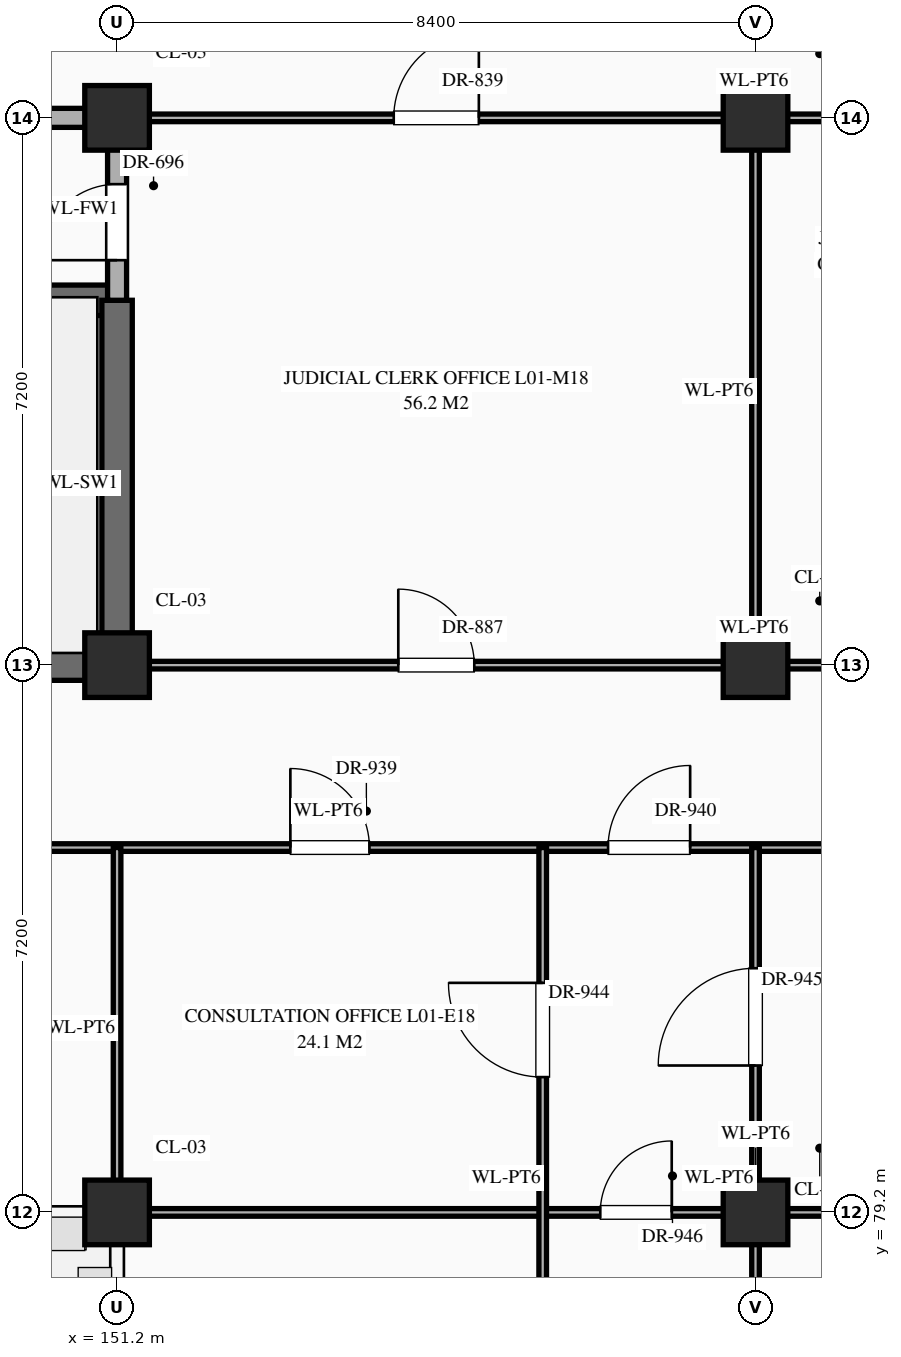
"""IFC4 building model, lengths in metres.
Left out: names, types, materials, properties, quantities, classifications, styles, units other than length and angle.
Written with IfcOpenShell. Run it as: python <this file> out.ifc"""

import sys

from ifc_helpers import new_model, si_unit, direction, frame, frame_2d, origin, origin_2d, place, context, subcontext, project, spatial, rectangle, extrude, element, fill, save


model = new_model("IFC4")
c1 = context("Model", 3, precision=1e-05, world=origin(), true_north=direction((0.0, 1.0)))
c2 = subcontext(c1, "Body", "Model", "MODEL_VIEW")
j1 = project(units=[si_unit("LENGTHUNIT", "METRE"), si_unit("PLANEANGLEUNIT", "RADIAN")], contexts=[c1])
p1 = place(None, origin())
s1 = spatial("IfcSite", under=j1, at=p1, CompositionType="ELEMENT")
p2 = place(p1, origin())
s2 = spatial("IfcBuilding", under=s1, at=p2, CompositionType="ELEMENT")
p3 = place(p2, origin())
s3 = spatial("IfcBuildingStorey", under=s2, at=p3, CompositionType="ELEMENT", Elevation=0.0)
for number, where, z_axis, x_axis in (
    (1, (151.2, 79.2, 0.0), (0.0, 0.0, 1.0), (1.0, 0.0, 0.0)),
    (2, (151.2, 86.4, 0.0), (0.0, 0.0, 1.0), (1.0, 0.0, 0.0)),
    (3, (151.2, 93.6, 0.0), (0.0, 0.0, 1.0), (1.0, 0.0, 0.0)),
    (4, (159.6, 79.2, 0.0), (0.0, 0.0, 1.0), (1.0, 0.0, 0.0)),
    (5, (159.6, 86.4, 0.0), (0.0, 0.0, 1.0), (1.0, 0.0, 0.0)),
    (6, (159.6, 93.6, 0.0), (0.0, 0.0, 1.0), (1.0, 0.0, 0.0)),
):
    element("IfcColumn", number, at=place(p3, frame(where, z_axis=z_axis, x_axis=x_axis)), inside=s3, PredefinedType="COLUMN", context=c2, shape_type="SweptSolid", body=[
        extrude(rectangle(XDim=0.85, YDim=0.85, at=origin_2d()), origin(), (0.0, 0.0, 1.0), 5.4),
    ])
p4 = place(p3, frame((151.24, 79.2, 0.0), z_axis=(0.0, 0.0, 1.0), x_axis=(1.0, 0.0, 0.0)))
e7 = element("IfcWall", 7, at=p4, inside=s3, PredefinedType="STANDARD", context=c2, shape_type="SweptSolid", body=[
    extrude(rectangle(XDim=16.72, YDim=0.1, at=frame_2d((8.36, 0.0))), origin(), (0.0, 0.0, 1.0), 4.27),
])
p5 = place(p4, frame((6.317, 0.0, 0.0)))
e8 = element("IfcOpeningElement", 8, at=p5, cuts=e7, PredefinedType="OPENING", context=c2, shape_type="SweptSolid", body=[
    extrude(rectangle(XDim=0.94, YDim=2.3, at=frame_2d((0.47, 1.15))), frame((0.0, 0.062, 0.0), z_axis=(0.0, -1.0, 0.0), x_axis=(1.0, 0.0, 0.0)), (0.0, 0.0, 1.0), 0.124),
])
p6 = place(p3, frame((140.0, 84.0, 0.0), z_axis=(0.0, 0.0, 1.0), x_axis=(1.0, 0.0, 0.0)))
e9 = element("IfcWall", 9, at=p6, inside=s3, PredefinedType="STANDARD", context=c2, shape_type="SweptSolid", body=[
    extrude(rectangle(XDim=27.96, YDim=0.1, at=frame_2d((13.98, 0.0))), origin(), (0.0, 0.0, 1.0), 5.12),
])
p7 = place(p6, frame((0.92, 0.0, 0.0)))
e10 = element("IfcOpeningElement", 10, at=p7, cuts=e9, PredefinedType="OPENING", context=c2, shape_type="SweptSolid", body=[
    extrude(rectangle(XDim=0.96, YDim=2.2, at=frame_2d((0.48, 1.1))), frame((0.0, 0.062, 0.0), z_axis=(0.0, -1.0, 0.0), x_axis=(1.0, 0.0, 0.0)), (0.0, 0.0, 1.0), 0.124),
])
p8 = place(p6, frame((6.5, 0.0, 0.0)))
e11 = element("IfcOpeningElement", 11, at=p8, cuts=e9, PredefinedType="OPENING", context=c2, shape_type="SweptSolid", body=[
    extrude(rectangle(XDim=1.0, YDim=2.25, at=frame_2d((0.5, 1.125))), frame((0.0, 0.062, 0.0), z_axis=(0.0, -1.0, 0.0), x_axis=(1.0, 0.0, 0.0)), (0.0, 0.0, 1.0), 0.124),
])
p9 = place(p6, frame((13.48, 0.0, 0.0)))
e12 = element("IfcOpeningElement", 12, at=p9, cuts=e9, PredefinedType="OPENING", context=c2, shape_type="SweptSolid", body=[
    extrude(rectangle(XDim=1.04, YDim=2.2, at=frame_2d((0.52, 1.1))), frame((0.0, 0.062, 0.0), z_axis=(0.0, -1.0, 0.0), x_axis=(1.0, 0.0, 0.0)), (0.0, 0.0, 1.0), 0.124),
])
p10 = place(p6, frame((17.66, 0.0, 0.0)))
e13 = element("IfcOpeningElement", 13, at=p10, cuts=e9, PredefinedType="OPENING", context=c2, shape_type="SweptSolid", body=[
    extrude(rectangle(XDim=1.08, YDim=2.25, at=frame_2d((0.54, 1.125))), frame((0.0, 0.062, 0.0), z_axis=(0.0, -1.0, 0.0), x_axis=(1.0, 0.0, 0.0)), (0.0, 0.0, 1.0), 0.124),
])
p11 = place(p6, frame((23.22, 0.0, 0.0)))
e14 = element("IfcOpeningElement", 14, at=p11, cuts=e9, PredefinedType="OPENING", context=c2, shape_type="SweptSolid", body=[
    extrude(rectangle(XDim=1.12, YDim=2.25, at=frame_2d((0.56, 1.125))), frame((0.0, 0.062, 0.0), z_axis=(0.0, -1.0, 0.0), x_axis=(1.0, 0.0, 0.0)), (0.0, 0.0, 1.0), 0.124),
])
p12 = place(p3, frame((142.8, 86.4, 0.0), z_axis=(0.0, 0.0, 1.0), x_axis=(1.0, 0.0, 0.0)))
e15 = element("IfcWall", 15, at=p12, inside=s3, PredefinedType="SHEAR", context=c2, shape_type="SweptSolid", body=[
    extrude(rectangle(XDim=8.4, YDim=0.4, at=frame_2d((4.2, 0.0))), origin(), (0.0, 0.0, 1.0), 5.12),
])
p13 = place(p3, frame((151.2, 86.4, 0.0), z_axis=(0.0, 0.0, 1.0), x_axis=(1.0, 0.0, 0.0)))
e16 = element("IfcWall", 16, at=p13, inside=s3, PredefinedType="STANDARD", context=c2, shape_type="SweptSolid", body=[
    extrude(rectangle(XDim=16.76, YDim=0.1, at=frame_2d((8.38, 0.0))), origin(), (0.0, 0.0, 1.0), 4.27),
])
p14 = place(p13, frame((3.7, 0.0, 0.0)))
e17 = element("IfcOpeningElement", 17, at=p14, cuts=e16, PredefinedType="OPENING", context=c2, shape_type="SweptSolid", body=[
    extrude(rectangle(XDim=1.0, YDim=2.25, at=frame_2d((0.5, 1.125))), frame((0.0, 0.062, 0.0), z_axis=(0.0, -1.0, 0.0), x_axis=(1.0, 0.0, 0.0)), (0.0, 0.0, 1.0), 0.124),
])
p15 = place(p13, frame((9.433, 0.0, 0.0)))
e18 = element("IfcOpeningElement", 18, at=p15, cuts=e16, PredefinedType="OPENING", context=c2, shape_type="SweptSolid", body=[
    extrude(rectangle(XDim=1.08, YDim=2.25, at=frame_2d((0.54, 1.125))), frame((0.0, 0.062, 0.0), z_axis=(0.0, -1.0, 0.0), x_axis=(1.0, 0.0, 0.0)), (0.0, 0.0, 1.0), 0.124),
])
p16 = place(p13, frame((12.02, 0.0, 0.0)))
e19 = element("IfcOpeningElement", 19, at=p16, cuts=e16, PredefinedType="OPENING", context=c2, shape_type="SweptSolid", body=[
    extrude(rectangle(XDim=1.16, YDim=2.3, at=frame_2d((0.58, 1.15))), frame((0.0, 0.062, 0.0), z_axis=(0.0, -1.0, 0.0), x_axis=(1.0, 0.0, 0.0)), (0.0, 0.0, 1.0), 0.124),
])
p17 = place(p13, frame((14.627, 0.0, 0.0)))
e20 = element("IfcOpeningElement", 20, at=p17, cuts=e16, PredefinedType="OPENING", context=c2, shape_type="SweptSolid", body=[
    extrude(rectangle(XDim=1.2, YDim=2.35, at=frame_2d((0.6, 1.175))), frame((0.0, 0.062, 0.0), z_axis=(0.0, -1.0, 0.0), x_axis=(1.0, 0.0, 0.0)), (0.0, 0.0, 1.0), 0.124),
])
p18 = place(p3, frame((142.8, 91.2, 0.0), z_axis=(0.0, 0.0, 1.0), x_axis=(1.0, 0.0, 0.0)))
e21 = element("IfcWall", 21, at=p18, inside=s3, PredefinedType="SHEAR", context=c2, shape_type="SweptSolid", body=[
    extrude(rectangle(XDim=8.4, YDim=0.4, at=frame_2d((4.2, 0.0))), origin(), (0.0, 0.0, 1.0), 5.12),
])
p19 = place(p18, frame((0.65, 0.0, 0.0)))
e22 = element("IfcOpeningElement", 22, at=p19, cuts=e21, PredefinedType="OPENING", context=c2, shape_type="SweptSolid", body=[
    extrude(rectangle(XDim=1.1, YDim=2.2, at=frame_2d((0.55, 1.1))), frame((0.0, 0.212, 0.0), z_axis=(0.0, -1.0, 0.0), x_axis=(1.0, 0.0, 0.0)), (0.0, 0.0, 1.0), 0.424),
])
p20 = place(p3, frame((137.2, 93.6, 0.0), z_axis=(0.0, 0.0, 1.0), x_axis=(1.0, 0.0, 0.0)))
e23 = element("IfcWall", 23, at=p20, inside=s3, PredefinedType="STANDARD", context=c2, shape_type="SweptSolid", body=[
    extrude(rectangle(XDim=14.0, YDim=0.25, at=frame_2d((7.0, 0.0))), origin(), (0.0, 0.0, 1.0), 4.27),
])
p21 = place(p20, frame((8.8, 0.0, 0.0)))
e24 = element("IfcOpeningElement", 24, at=p21, cuts=e23, PredefinedType="OPENING", context=c2, shape_type="SweptSolid", body=[
    extrude(rectangle(XDim=2.0, YDim=2.4, at=frame_2d((1.0, 1.2))), frame((0.0, 0.137, 0.0), z_axis=(0.0, -1.0, 0.0), x_axis=(1.0, 0.0, 0.0)), (0.0, 0.0, 1.0), 0.274),
])
p22 = place(p20, frame((0.65, 0.0, 0.0)))
e25 = element("IfcOpeningElement", 25, at=p22, cuts=e23, PredefinedType="OPENING", context=c2, shape_type="SweptSolid", body=[
    extrude(rectangle(XDim=1.5, YDim=2.25, at=frame_2d((0.75, 1.125))), frame((0.0, 0.137, 0.0), z_axis=(0.0, -1.0, 0.0), x_axis=(1.0, 0.0, 0.0)), (0.0, 0.0, 1.0), 0.274),
])
p23 = place(p20, frame((3.028, 0.0, 0.0)))
e26 = element("IfcOpeningElement", 26, at=p23, cuts=e23, PredefinedType="OPENING", context=c2, shape_type="SweptSolid", body=[
    extrude(rectangle(XDim=2.0, YDim=2.4, at=frame_2d((1.0, 1.2))), frame((0.0, 0.137, 0.0), z_axis=(0.0, -1.0, 0.0), x_axis=(1.0, 0.0, 0.0)), (0.0, 0.0, 1.0), 0.274),
])
p24 = place(p3, frame((151.2, 93.6, 0.0), z_axis=(0.0, 0.0, 1.0), x_axis=(1.0, 0.0, 0.0)))
e27 = element("IfcWall", 27, at=p24, inside=s3, PredefinedType="STANDARD", context=c2, shape_type="SweptSolid", body=[
    extrude(rectangle(XDim=16.76, YDim=0.1, at=frame_2d((8.38, 0.0))), origin(), (0.0, 0.0, 1.0), 4.27),
])
p25 = place(p24, frame((3.64, 0.0, 0.0)))
e28 = element("IfcOpeningElement", 28, at=p25, cuts=e27, PredefinedType="OPENING", context=c2, shape_type="SweptSolid", body=[
    extrude(rectangle(XDim=1.12, YDim=2.25, at=frame_2d((0.56, 1.125))), frame((0.0, 0.062, 0.0), z_axis=(0.0, -1.0, 0.0), x_axis=(1.0, 0.0, 0.0)), (0.0, 0.0, 1.0), 0.124),
])
p26 = place(p24, frame((9.393, 0.0, 0.0)))
e29 = element("IfcOpeningElement", 29, at=p26, cuts=e27, PredefinedType="OPENING", context=c2, shape_type="SweptSolid", body=[
    extrude(rectangle(XDim=1.16, YDim=2.3, at=frame_2d((0.58, 1.15))), frame((0.0, 0.062, 0.0), z_axis=(0.0, -1.0, 0.0), x_axis=(1.0, 0.0, 0.0)), (0.0, 0.0, 1.0), 0.124),
])
p27 = place(p24, frame((12.0, 0.0, 0.0)))
e30 = element("IfcOpeningElement", 30, at=p27, cuts=e27, PredefinedType="OPENING", context=c2, shape_type="SweptSolid", body=[
    extrude(rectangle(XDim=1.2, YDim=2.35, at=frame_2d((0.6, 1.175))), frame((0.0, 0.062, 0.0), z_axis=(0.0, -1.0, 0.0), x_axis=(1.0, 0.0, 0.0)), (0.0, 0.0, 1.0), 0.124),
])
p28 = place(p24, frame((14.607, 0.0, 0.0)))
e31 = element("IfcOpeningElement", 31, at=p28, cuts=e27, PredefinedType="OPENING", context=c2, shape_type="SweptSolid", body=[
    extrude(rectangle(XDim=1.24, YDim=2.3, at=frame_2d((0.62, 1.15))), frame((0.0, 0.062, 0.0), z_axis=(0.0, -1.0, 0.0), x_axis=(1.0, 0.0, 0.0)), (0.0, 0.0, 1.0), 0.124),
])
p29 = place(p3, frame((151.2, 79.24, 0.0), z_axis=(0.0, 0.0, 1.0), x_axis=(0.0, 1.0, 0.0)))
e32 = element("IfcWall", 32, at=p29, inside=s3, PredefinedType="STANDARD", context=c2, shape_type="SweptSolid", body=[
    extrude(rectangle(XDim=4.76, YDim=0.1, at=frame_2d((2.38, 0.0))), origin(), (0.0, 0.0, 1.0), 4.37),
])
p30 = place(p3, frame((151.2, 86.4, 0.0), z_axis=(0.0, 0.0, 1.0), x_axis=(0.0, 1.0, 0.0)))
e33 = element("IfcWall", 33, at=p30, inside=s3, PredefinedType="SHEAR", context=c2, shape_type="SweptSolid", body=[
    extrude(rectangle(XDim=4.8, YDim=0.4, at=frame_2d((2.4, 0.0))), origin(), (0.0, 0.0, 1.0), 5.12),
])
p31 = place(p3, frame((151.2, 91.2, 0.0), z_axis=(0.0, 0.0, 1.0), x_axis=(0.0, 1.0, 0.0)))
e34 = element("IfcWall", 34, at=p31, inside=s3, PredefinedType="STANDARD", context=c2, shape_type="SweptSolid", body=[
    extrude(rectangle(XDim=2.4, YDim=0.25, at=frame_2d((1.2, 0.0))), origin(), (0.0, 0.0, 1.0), 4.37),
])
p32 = place(p31, frame((0.528, 0.0, 0.0)))
e35 = element("IfcOpeningElement", 35, at=p32, cuts=e34, PredefinedType="OPENING", context=c2, shape_type="SweptSolid", body=[
    extrude(rectangle(XDim=1.0, YDim=2.2, at=frame_2d((0.5, 1.1))), frame((0.0, 0.137, 0.0), z_axis=(0.0, -1.0, 0.0), x_axis=(1.0, 0.0, 0.0)), (0.0, 0.0, 1.0), 0.274),
])
p33 = place(p3, frame((156.8, 57.6, 0.0), z_axis=(0.0, 0.0, 1.0), x_axis=(0.0, 1.0, 0.0)))
e36 = element("IfcWall", 36, at=p33, inside=s3, PredefinedType="STANDARD", context=c2, shape_type="SweptSolid", body=[
    extrude(rectangle(XDim=26.4, YDim=0.1, at=frame_2d((13.2, 0.0))), origin(), (0.0, 0.0, 1.0), 5.12),
])
p34 = place(p33, frame((23.38, 0.0, 0.0)))
e37 = element("IfcOpeningElement", 37, at=p34, cuts=e36, PredefinedType="OPENING", context=c2, shape_type="SweptSolid", body=[
    extrude(rectangle(XDim=1.24, YDim=2.3, at=frame_2d((0.62, 1.15))), frame((0.0, 0.062, 0.0), z_axis=(0.0, -1.0, 0.0), x_axis=(1.0, 0.0, 0.0)), (0.0, 0.0, 1.0), 0.124),
])
p35 = place(p33, frame((3.07, 0.0, 0.0)))
e38 = element("IfcOpeningElement", 38, at=p35, cuts=e36, PredefinedType="OPENING", context=c2, shape_type="SweptSolid", body=[
    extrude(rectangle(XDim=1.06, YDim=2.4, at=frame_2d((0.53, 1.2))), frame((0.0, 0.062, 0.0), z_axis=(0.0, -1.0, 0.0), x_axis=(1.0, 0.0, 0.0)), (0.0, 0.0, 1.0), 0.124),
])
p36 = place(p33, frame((10.23, 0.0, 0.0)))
e39 = element("IfcOpeningElement", 39, at=p36, cuts=e36, PredefinedType="OPENING", context=c2, shape_type="SweptSolid", body=[
    extrude(rectangle(XDim=1.14, YDim=2.4, at=frame_2d((0.57, 1.2))), frame((0.0, 0.062, 0.0), z_axis=(0.0, -1.0, 0.0), x_axis=(1.0, 0.0, 0.0)), (0.0, 0.0, 1.0), 0.124),
])
p37 = place(p33, frame((17.55, 0.0, 0.0)))
e40 = element("IfcOpeningElement", 40, at=p37, cuts=e36, PredefinedType="OPENING", context=c2, shape_type="SweptSolid", body=[
    extrude(rectangle(XDim=0.9, YDim=2.15, at=frame_2d((0.45, 1.075))), frame((0.0, 0.062, 0.0), z_axis=(0.0, -1.0, 0.0), x_axis=(1.0, 0.0, 0.0)), (0.0, 0.0, 1.0), 0.124),
])
p38 = place(p3, frame((159.6, 43.2, 0.0), z_axis=(0.0, 0.0, 1.0), x_axis=(0.0, 1.0, 0.0)))
e41 = element("IfcWall", 41, at=p38, inside=s3, PredefinedType="STANDARD", context=c2, shape_type="SweptSolid", body=[
    extrude(rectangle(XDim=40.8, YDim=0.1, at=frame_2d((20.4, 0.0))), origin(), (0.0, 0.0, 1.0), 4.37),
])
p39 = place(p38, frame((37.933, 0.0, 0.0)))
e42 = element("IfcOpeningElement", 42, at=p39, cuts=e41, PredefinedType="OPENING", context=c2, shape_type="SweptSolid", body=[
    extrude(rectangle(XDim=1.28, YDim=2.35, at=frame_2d((0.64, 1.175))), frame((0.0, 0.062, 0.0), z_axis=(0.0, -1.0, 0.0), x_axis=(1.0, 0.0, 0.0)), (0.0, 0.0, 1.0), 0.124),
])
p40 = place(p38, frame((0.942, 0.0, 0.0)))
e43 = element("IfcOpeningElement", 43, at=p40, cuts=e41, PredefinedType="OPENING", context=c2, shape_type="SweptSolid", body=[
    extrude(rectangle(XDim=0.86, YDim=2.1, at=frame_2d((0.43, 1.05))), frame((0.0, 0.062, 0.0), z_axis=(0.0, -1.0, 0.0), x_axis=(1.0, 0.0, 0.0)), (0.0, 0.0, 1.0), 0.124),
])
p41 = place(p38, frame((4.167, 0.0, 0.0)))
e44 = element("IfcOpeningElement", 44, at=p41, cuts=e41, PredefinedType="OPENING", context=c2, shape_type="SweptSolid", body=[
    extrude(rectangle(XDim=0.92, YDim=2.15, at=frame_2d((0.46, 1.075))), frame((0.0, 0.062, 0.0), z_axis=(0.0, -1.0, 0.0), x_axis=(1.0, 0.0, 0.0)), (0.0, 0.0, 1.0), 0.124),
])
p42 = place(p38, frame((10.32, 0.0, 0.0)))
e45 = element("IfcOpeningElement", 45, at=p42, cuts=e41, PredefinedType="OPENING", context=c2, shape_type="SweptSolid", body=[
    extrude(rectangle(XDim=0.96, YDim=2.2, at=frame_2d((0.48, 1.1))), frame((0.0, 0.062, 0.0), z_axis=(0.0, -1.0, 0.0), x_axis=(1.0, 0.0, 0.0)), (0.0, 0.0, 1.0), 0.124),
])
p43 = place(p38, frame((17.5, 0.0, 0.0)))
e46 = element("IfcOpeningElement", 46, at=p43, cuts=e41, PredefinedType="OPENING", context=c2, shape_type="SweptSolid", body=[
    extrude(rectangle(XDim=1.0, YDim=2.25, at=frame_2d((0.5, 1.125))), frame((0.0, 0.062, 0.0), z_axis=(0.0, -1.0, 0.0), x_axis=(1.0, 0.0, 0.0)), (0.0, 0.0, 1.0), 0.124),
])
p44 = place(p38, frame((24.68, 0.0, 0.0)))
e47 = element("IfcOpeningElement", 47, at=p44, cuts=e41, PredefinedType="OPENING", context=c2, shape_type="SweptSolid", body=[
    extrude(rectangle(XDim=1.04, YDim=2.2, at=frame_2d((0.52, 1.1))), frame((0.0, 0.062, 0.0), z_axis=(0.0, -1.0, 0.0), x_axis=(1.0, 0.0, 0.0)), (0.0, 0.0, 1.0), 0.124),
])
p45 = place(p38, frame((31.86, 0.0, 0.0)))
e48 = element("IfcOpeningElement", 48, at=p45, cuts=e41, PredefinedType="OPENING", context=c2, shape_type="SweptSolid", body=[
    extrude(rectangle(XDim=1.08, YDim=2.25, at=frame_2d((0.54, 1.125))), frame((0.0, 0.062, 0.0), z_axis=(0.0, -1.0, 0.0), x_axis=(1.0, 0.0, 0.0)), (0.0, 0.0, 1.0), 0.124),
])
p46 = place(p3, frame((159.6, 86.4, 0.0), z_axis=(0.0, 0.0, 1.0), x_axis=(0.0, 1.0, 0.0)))
e49 = element("IfcWall", 49, at=p46, inside=s3, PredefinedType="STANDARD", context=c2, shape_type="SweptSolid", body=[
    extrude(rectangle(XDim=7.2, YDim=0.1, at=frame_2d((3.6, 0.0))), origin(), (0.0, 0.0, 1.0), 4.37),
])
p47 = place(p32, origin())
e50 = element("IfcDoor", 50, at=p47, inside=s3, OperationType="SINGLE_SWING_LEFT", PredefinedType="DOOR", context=c2, shape_type="SweptSolid", body=[
    extrude(rectangle(XDim=1.0, YDim=2.2, at=frame_2d((0.5, 1.1))), frame((0.0, 0.025, 0.0), z_axis=(0.0, -1.0, 0.0), x_axis=(1.0, 0.0, 0.0)), (0.0, 0.0, 1.0), 0.05),
])
fill(e35, e50)
p48 = place(p25, origin())
e51 = element("IfcDoor", 51, at=p48, inside=s3, OperationType="SINGLE_SWING_RIGHT", PredefinedType="DOOR", context=c2, shape_type="SweptSolid", body=[
    extrude(rectangle(XDim=1.12, YDim=2.25, at=frame_2d((0.56, 1.125))), frame((0.0, 0.025, 0.0), z_axis=(0.0, -1.0, 0.0), x_axis=(1.0, 0.0, 0.0)), (0.0, 0.0, 1.0), 0.05),
])
fill(e28, e51)
p49 = place(p14, origin())
e52 = element("IfcDoor", 52, at=p49, inside=s3, OperationType="SINGLE_SWING_LEFT", PredefinedType="DOOR", context=c2, shape_type="SweptSolid", body=[
    extrude(rectangle(XDim=1.0, YDim=2.25, at=frame_2d((0.5, 1.125))), frame((0.0, 0.025, 0.0), z_axis=(0.0, -1.0, 0.0), x_axis=(1.0, 0.0, 0.0)), (0.0, 0.0, 1.0), 0.05),
])
fill(e17, e52)
p50 = place(p9, origin())
e53 = element("IfcDoor", 53, at=p50, inside=s3, OperationType="SINGLE_SWING_LEFT", PredefinedType="DOOR", context=c2, shape_type="SweptSolid", body=[
    extrude(rectangle(XDim=1.04, YDim=2.2, at=frame_2d((0.52, 1.1))), frame((0.0, 0.025, 0.0), z_axis=(0.0, -1.0, 0.0), x_axis=(1.0, 0.0, 0.0)), (0.0, 0.0, 1.0), 0.05),
])
fill(e12, e53)
p51 = place(p10, origin())
e54 = element("IfcDoor", 54, at=p51, inside=s3, OperationType="SINGLE_SWING_RIGHT", PredefinedType="DOOR", context=c2, shape_type="SweptSolid", body=[
    extrude(rectangle(XDim=1.08, YDim=2.25, at=frame_2d((0.54, 1.125))), frame((0.0, 0.025, 0.0), z_axis=(0.0, -1.0, 0.0), x_axis=(1.0, 0.0, 0.0)), (0.0, 0.0, 1.0), 0.05),
])
fill(e13, e54)
p52 = place(p34, origin())
e55 = element("IfcDoor", 55, at=p52, inside=s3, OperationType="SINGLE_SWING_RIGHT", PredefinedType="DOOR", context=c2, shape_type="SweptSolid", body=[
    extrude(rectangle(XDim=1.24, YDim=2.3, at=frame_2d((0.62, 1.15))), frame((0.0, 0.025, 0.0), z_axis=(0.0, -1.0, 0.0), x_axis=(1.0, 0.0, 0.0)), (0.0, 0.0, 1.0), 0.05),
])
fill(e37, e55)
p53 = place(p39, origin())
e56 = element("IfcDoor", 56, at=p53, inside=s3, OperationType="SINGLE_SWING_LEFT", PredefinedType="DOOR", context=c2, shape_type="SweptSolid", body=[
    extrude(rectangle(XDim=1.28, YDim=2.35, at=frame_2d((0.64, 1.175))), frame((0.0, 0.025, 0.0), z_axis=(0.0, -1.0, 0.0), x_axis=(1.0, 0.0, 0.0)), (0.0, 0.0, 1.0), 0.05),
])
fill(e42, e56)
p54 = place(p5, origin())
e57 = element("IfcDoor", 57, at=p54, inside=s3, OperationType="SINGLE_SWING_RIGHT", PredefinedType="DOOR", context=c2, shape_type="SweptSolid", body=[
    extrude(rectangle(XDim=0.94, YDim=2.3, at=frame_2d((0.47, 1.15))), frame((0.0, 0.025, 0.0), z_axis=(0.0, -1.0, 0.0), x_axis=(1.0, 0.0, 0.0)), (0.0, 0.0, 1.0), 0.05),
])
fill(e8, e57)
save(model, sys.argv[1])
